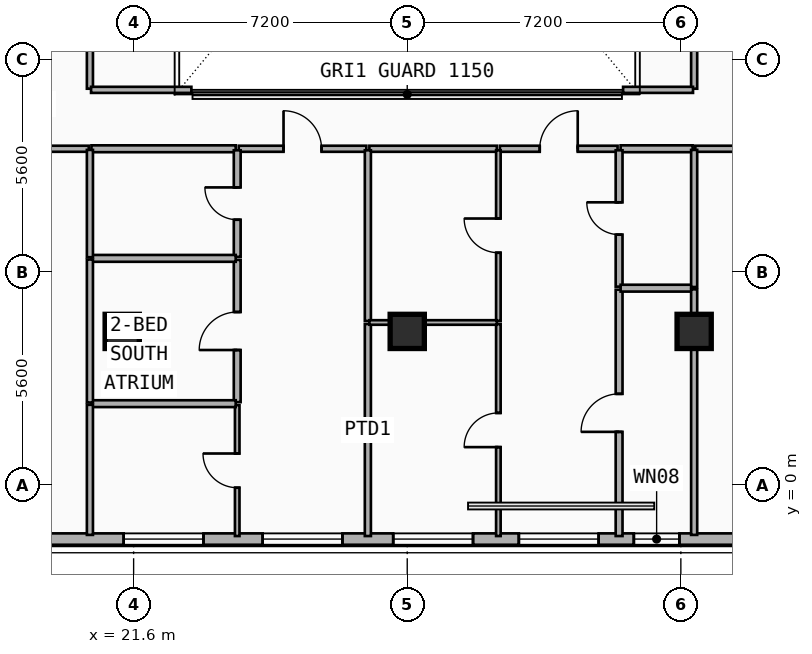
"""IFC4 building model, lengths in metres.
Left out: names, types, materials, properties, quantities, classifications, styles, units other than length and angle.
Written with IfcOpenShell. Run it as: python <this file> out.ifc"""

import sys

from ifc_helpers import new_model, si_unit, direction, frame, frame_2d, origin, origin_2d, place, context, subcontext, project, spatial, rectangle, extrude, element, fill, save


model = new_model("IFC4")
c1 = context("Model", 3, precision=1e-05, world=origin(), true_north=direction((0.0, 1.0)))
c2 = subcontext(c1, "Body", "Model", "MODEL_VIEW")
j1 = project(units=[si_unit("LENGTHUNIT", "METRE"), si_unit("PLANEANGLEUNIT", "RADIAN")], contexts=[c1])
p1 = place(None, origin())
s1 = spatial("IfcSite", under=j1, at=p1, CompositionType="ELEMENT")
p2 = place(p1, origin())
s2 = spatial("IfcBuilding", under=s1, at=p2, CompositionType="ELEMENT")
p3 = place(p2, frame((0.0, 0.0, 243.6)))
s3 = spatial("IfcBuildingStorey", under=s2, at=p3, CompositionType="ELEMENT", Elevation=243.6)
for number, where, z_axis, x_axis in (
    (1, (21.3, 4.153, 0.0), (0.0, -0.09, 0.996), (1.0, 0.0, 0.0)),
    (2, (28.8, 4.153, 0.0), (0.0, -0.09, 0.996), (1.0, 0.0, 0.0)),
    (3, (36.35, 4.153, 0.0), (0.0, -0.09, 0.996), (1.0, 0.0, 0.0)),
):
    element("IfcColumn", number, at=place(p3, frame(where, z_axis=z_axis, x_axis=x_axis)), inside=s3, PredefinedType="COLUMN", context=c2, shape_type="SweptSolid", body=[
        extrude(rectangle(XDim=0.9, YDim=0.9, at=origin_2d()), origin(), (0.0, 0.0, 1.0), 3.715),
    ])
p4 = place(p3, frame((45.2, -1.42, 0.0), z_axis=(0.0, 0.0, 1.0), x_axis=(-1.0, 0.0, 0.0)))
e4 = element("IfcWall", 4, at=p4, inside=s3, PredefinedType="SOLIDWALL", context=c2, shape_type="SweptSolid", body=[
    extrude(rectangle(XDim=32.8, YDim=0.3, at=frame_2d((16.4, 0.0))), origin(), (0.0, 0.0, 1.0), 3.42),
])
p5 = place(p4, frame((29.071, 0.0, 0.75)))
e5 = element("IfcOpeningElement", 5, at=p5, cuts=e4, PredefinedType="OPENING", context=c2, shape_type="SweptSolid", body=[
    extrude(rectangle(XDim=2.1, YDim=2.1, at=frame_2d((1.05, 1.05))), frame((0.0, 0.16, 0.0), z_axis=(0.0, -1.0, 0.0), x_axis=(1.0, 0.0, 0.0)), (0.0, 0.0, 1.0), 0.32),
])
p6 = place(p4, frame((26.745, 0.0, 0.75)))
e6 = element("IfcOpeningElement", 6, at=p6, cuts=e4, PredefinedType="OPENING", context=c2, shape_type="SweptSolid", body=[
    extrude(rectangle(XDim=1.6, YDim=1.95, at=frame_2d((0.8, 0.975))), frame((0.0, 0.16, 0.0), z_axis=(0.0, -1.0, 0.0), x_axis=(1.0, 0.0, 0.0)), (0.0, 0.0, 1.0), 0.32),
])
p7 = place(p4, frame((18.105, 0.0, 0.75)))
e7 = element("IfcOpeningElement", 7, at=p7, cuts=e4, PredefinedType="OPENING", context=c2, shape_type="SweptSolid", body=[
    extrude(rectangle(XDim=2.1, YDim=2.1, at=frame_2d((1.05, 1.05))), frame((0.0, 0.16, 0.0), z_axis=(0.0, -1.0, 0.0), x_axis=(1.0, 0.0, 0.0)), (0.0, 0.0, 1.0), 0.32),
])
p8 = place(p4, frame((21.762, 0.0, 0.75)))
e8 = element("IfcOpeningElement", 8, at=p8, cuts=e4, PredefinedType="OPENING", context=c2, shape_type="SweptSolid", body=[
    extrude(rectangle(XDim=2.1, YDim=2.1, at=frame_2d((1.05, 1.05))), frame((0.0, 0.16, 0.0), z_axis=(0.0, -1.0, 0.0), x_axis=(1.0, 0.0, 0.0)), (0.0, 0.0, 1.0), 0.32),
])
p9 = place(p4, frame((11.364, 0.0, 0.75)))
e9 = element("IfcOpeningElement", 9, at=p9, cuts=e4, PredefinedType="OPENING", context=c2, shape_type="SweptSolid", body=[
    extrude(rectangle(XDim=2.1, YDim=2.1, at=frame_2d((1.05, 1.05))), frame((0.0, 0.16, 0.0), z_axis=(0.0, -1.0, 0.0), x_axis=(1.0, 0.0, 0.0)), (0.0, 0.0, 1.0), 0.32),
])
p10 = place(p4, frame((9.238, 0.0, 0.68)))
e10 = element("IfcOpeningElement", 10, at=p10, cuts=e4, PredefinedType="OPENING", context=c2, shape_type="SweptSolid", body=[
    extrude(rectangle(XDim=1.2, YDim=1.5, at=frame_2d((0.6, 0.75))), frame((0.0, 0.16, 0.0), z_axis=(0.0, -1.0, 0.0), x_axis=(1.0, 0.0, 0.0)), (0.0, 0.0, 1.0), 0.32),
])
p11 = place(p4, frame((14.669, 0.0, 0.75)))
e11 = element("IfcOpeningElement", 11, at=p11, cuts=e4, PredefinedType="OPENING", context=c2, shape_type="SweptSolid", body=[
    extrude(rectangle(XDim=2.1, YDim=2.1, at=frame_2d((1.05, 1.05))), frame((0.0, 0.16, 0.0), z_axis=(0.0, -1.0, 0.0), x_axis=(1.0, 0.0, 0.0)), (0.0, 0.0, 1.0), 0.32),
])
p12 = place(p4, frame((1.937, 0.0, 0.75)))
e12 = element("IfcOpeningElement", 12, at=p12, cuts=e4, PredefinedType="OPENING", context=c2, shape_type="SweptSolid", body=[
    extrude(rectangle(XDim=2.1, YDim=2.1, at=frame_2d((1.05, 1.05))), frame((0.0, 0.16, 0.0), z_axis=(0.0, -1.0, 0.0), x_axis=(1.0, 0.0, 0.0)), (0.0, 0.0, 1.0), 0.32),
])
p13 = place(p4, frame((4.709, 0.0, 0.8)))
e13 = element("IfcOpeningElement", 13, at=p13, cuts=e4, PredefinedType="OPENING", context=c2, shape_type="SweptSolid", body=[
    extrude(rectangle(XDim=1.8, YDim=1.8, at=frame_2d((0.9, 0.9))), frame((0.0, 0.16, 0.0), z_axis=(0.0, -1.0, 0.0), x_axis=(1.0, 0.0, 0.0)), (0.0, 0.0, 1.0), 0.32),
])
p14 = place(p3, frame((24.366, 8.85, 0.0), z_axis=(0.0, 0.0, 1.0), x_axis=(1.0, 0.0, 0.0)))
e14 = element("IfcWall", 14, at=p14, inside=s3, PredefinedType="PARTITIONING", context=c2, shape_type="SweptSolid", body=[
    extrude(rectangle(XDim=3.358, YDim=0.16, at=frame_2d((1.679, 0.0))), origin(), (0.0, 0.0, 1.0), 3.42),
])
p15 = place(p14, frame((1.179, 0.0, 0.0)))
e15 = element("IfcOpeningElement", 15, at=p15, cuts=e14, PredefinedType="OPENING", context=c2, shape_type="SweptSolid", body=[
    extrude(rectangle(XDim=1.0, YDim=2.15, at=frame_2d((0.5, 1.075))), frame((0.0, 0.09, 0.0), z_axis=(0.0, -1.0, 0.0), x_axis=(1.0, 0.0, 0.0)), (0.0, 0.0, 1.0), 0.18),
])
p16 = place(p3, frame((20.49, 8.85, 0.0), z_axis=(0.0, 0.0, 1.0), x_axis=(1.0, 0.0, 0.0)))
e16 = element("IfcWall", 16, at=p16, inside=s3, PredefinedType="PLUMBINGWALL", context=c2, shape_type="SweptSolid", body=[
    extrude(rectangle(XDim=3.796, YDim=0.18, at=frame_2d((1.898, 0.0))), origin(), (0.0, 0.0, 1.0), 2.7),
])
p17 = place(p3, frame((31.238, 8.85, 0.0), z_axis=(0.0, 0.0, 1.0), x_axis=(1.0, 0.0, 0.0)))
e17 = element("IfcWall", 17, at=p17, inside=s3, PredefinedType="PARTITIONING", context=c2, shape_type="SweptSolid", body=[
    extrude(rectangle(XDim=3.097, YDim=0.16, at=frame_2d((1.548, 0.0))), origin(), (0.0, 0.0, 1.0), 3.42),
])
p18 = place(p17, frame((1.049, 0.0, 0.0)))
e18 = element("IfcOpeningElement", 18, at=p18, cuts=e17, PredefinedType="OPENING", context=c2, shape_type="SweptSolid", body=[
    extrude(rectangle(XDim=1.0, YDim=2.15, at=frame_2d((0.5, 1.075))), frame((0.0, 0.09, 0.0), z_axis=(0.0, -1.0, 0.0), x_axis=(1.0, 0.0, 0.0)), (0.0, 0.0, 1.0), 0.18),
])
p19 = place(p3, frame((34.415, 8.85, 0.0), z_axis=(0.0, 0.0, 1.0), x_axis=(1.0, 0.0, 0.0)))
e19 = element("IfcWall", 19, at=p19, inside=s3, PredefinedType="PLUMBINGWALL", context=c2, shape_type="SweptSolid", body=[
    extrude(rectangle(XDim=1.895, YDim=0.18, at=frame_2d((0.948, 0.0))), origin(), (0.0, 0.0, 1.0), 2.7),
])
p20 = place(p3, frame((27.804, 8.85, 0.0), z_axis=(0.0, 0.0, 1.0), x_axis=(1.0, 0.0, 0.0)))
e20 = element("IfcWall", 20, at=p20, inside=s3, PredefinedType="PARTITIONING", context=c2, shape_type="SweptSolid", body=[
    extrude(rectangle(XDim=3.354, YDim=0.16, at=frame_2d((1.677, 0.0))), origin(), (0.0, 0.0, 1.0), 2.7),
])
p21 = place(p3, frame((24.326, -1.34, 0.0), z_axis=(0.0, 0.0, 1.0), x_axis=(0.0, 1.0, 0.0)))
e21 = element("IfcWall", 21, at=p21, inside=s3, PredefinedType="PARTITIONING", context=c2, shape_type="SweptSolid", body=[
    extrude(rectangle(XDim=3.443, YDim=0.12, at=frame_2d((1.722, 0.0))), origin(), (0.0, 0.0, 1.0), 3.42),
])
p22 = place(p21, frame((1.271, 0.0, 0.0)))
e22 = element("IfcOpeningElement", 22, at=p22, cuts=e21, PredefinedType="OPENING", context=c2, shape_type="SweptSolid", body=[
    extrude(rectangle(XDim=0.9, YDim=2.1, at=frame_2d((0.45, 1.05))), frame((0.0, 0.07, 0.0), z_axis=(0.0, -1.0, 0.0), x_axis=(1.0, 0.0, 0.0)), (0.0, 0.0, 1.0), 0.14),
])
p23 = place(p3, frame((24.326, 2.183, 0.0), z_axis=(0.0, 0.0, 1.0), x_axis=(0.0, 1.0, 0.0)))
e23 = element("IfcWall", 23, at=p23, inside=s3, PredefinedType="PLUMBINGWALL", context=c2, shape_type="SweptSolid", body=[
    extrude(rectangle(XDim=3.743, YDim=0.18, at=frame_2d((1.872, 0.0))), origin(), (0.0, 0.0, 1.0), 3.08),
])
p24 = place(p23, frame((1.372, 0.0, 0.0)))
e24 = element("IfcOpeningElement", 24, at=p24, cuts=e23, PredefinedType="OPENING", context=c2, shape_type="SweptSolid", body=[
    extrude(rectangle(XDim=1.0, YDim=2.15, at=frame_2d((0.5, 1.075))), frame((0.0, 0.1, 0.0), z_axis=(0.0, -1.0, 0.0), x_axis=(1.0, 0.0, 0.0)), (0.0, 0.0, 1.0), 0.2),
])
p25 = place(p3, frame((24.326, 6.006, 0.0), z_axis=(0.0, 0.0, 1.0), x_axis=(0.0, 1.0, 0.0)))
e25 = element("IfcWall", 25, at=p25, inside=s3, PredefinedType="PLUMBINGWALL", context=c2, shape_type="SweptSolid", body=[
    extrude(rectangle(XDim=2.804, YDim=0.18, at=frame_2d((1.402, 0.0))), origin(), (0.0, 0.0, 1.0), 3.04),
])
p26 = place(p25, frame((0.977, 0.0, 0.0)))
e26 = element("IfcOpeningElement", 26, at=p26, cuts=e25, PredefinedType="OPENING", context=c2, shape_type="SweptSolid", body=[
    extrude(rectangle(XDim=0.85, YDim=2.1, at=frame_2d((0.425, 1.05))), frame((0.0, 0.1, 0.0), z_axis=(0.0, -1.0, 0.0), x_axis=(1.0, 0.0, 0.0)), (0.0, 0.0, 1.0), 0.2),
])
p27 = place(p3, frame((27.764, -1.34, 0.0), z_axis=(0.0, 0.0, 1.0), x_axis=(0.0, 1.0, 0.0)))
e27 = element("IfcWall", 27, at=p27, inside=s3, PredefinedType="PARTITIONING", context=c2, shape_type="SweptSolid", body=[
    extrude(rectangle(XDim=5.579, YDim=0.16, at=frame_2d((2.79, 0.0))), origin(), (0.0, 0.0, 1.0), 3.08),
])
p28 = place(p3, frame((27.764, 4.319, 0.0), z_axis=(0.0, 0.0, 1.0), x_axis=(0.0, 1.0, 0.0)))
e28 = element("IfcWall", 28, at=p28, inside=s3, PredefinedType="PARTITIONING", context=c2, shape_type="SweptSolid", body=[
    extrude(rectangle(XDim=4.491, YDim=0.16, at=frame_2d((2.246, 0.0))), origin(), (0.0, 0.0, 1.0), 3.04),
])
p29 = place(p3, frame((20.49, 2.143, 0.0), z_axis=(0.0, 0.0, 1.0), x_axis=(1.0, 0.0, 0.0)))
e29 = element("IfcWall", 29, at=p29, inside=s3, PredefinedType="PLUMBINGWALL", context=c2, shape_type="SweptSolid", body=[
    extrude(rectangle(XDim=3.796, YDim=0.18, at=frame_2d((1.898, 0.0))), origin(), (0.0, 0.0, 1.0), 3.42),
])
p30 = place(p3, frame((20.49, 5.966, 0.0), z_axis=(0.0, 0.0, 1.0), x_axis=(1.0, 0.0, 0.0)))
e30 = element("IfcWall", 30, at=p30, inside=s3, PredefinedType="PLUMBINGWALL", context=c2, shape_type="SweptSolid", body=[
    extrude(rectangle(XDim=3.796, YDim=0.18, at=frame_2d((1.898, 0.0))), origin(), (0.0, 0.0, 1.0), 2.7),
])
p31 = place(p3, frame((34.375, -1.34, 0.0), z_axis=(0.0, 0.0, 1.0), x_axis=(0.0, 1.0, 0.0)))
e31 = element("IfcWall", 31, at=p31, inside=s3, PredefinedType="PLUMBINGWALL", context=c2, shape_type="SweptSolid", body=[
    extrude(rectangle(XDim=6.482, YDim=0.18, at=frame_2d((3.241, 0.0))), origin(), (0.0, 0.0, 1.0), 3.08),
])
p32 = place(p31, frame((2.741, 0.0, 0.0)))
e32 = element("IfcOpeningElement", 32, at=p32, cuts=e31, PredefinedType="OPENING", context=c2, shape_type="SweptSolid", body=[
    extrude(rectangle(XDim=1.0, YDim=2.15, at=frame_2d((0.5, 1.075))), frame((0.0, 0.1, 0.0), z_axis=(0.0, -1.0, 0.0), x_axis=(1.0, 0.0, 0.0)), (0.0, 0.0, 1.0), 0.2),
])
p33 = place(p3, frame((34.375, 5.222, 0.0), z_axis=(0.0, 0.0, 1.0), x_axis=(0.0, 1.0, 0.0)))
e33 = element("IfcWall", 33, at=p33, inside=s3, PredefinedType="PLUMBINGWALL", context=c2, shape_type="SweptSolid", body=[
    extrude(rectangle(XDim=3.588, YDim=0.18, at=frame_2d((1.794, 0.0))), origin(), (0.0, 0.0, 1.0), 3.04),
])
p34 = place(p33, frame((1.369, 0.0, 0.0)))
e34 = element("IfcOpeningElement", 34, at=p34, cuts=e33, PredefinedType="OPENING", context=c2, shape_type="SweptSolid", body=[
    extrude(rectangle(XDim=0.85, YDim=2.1, at=frame_2d((0.425, 1.05))), frame((0.0, 0.1, 0.0), z_axis=(0.0, -1.0, 0.0), x_axis=(1.0, 0.0, 0.0)), (0.0, 0.0, 1.0), 0.2),
])
p35 = place(p3, frame((31.198, -1.34, 0.0), z_axis=(0.0, 0.0, 1.0), x_axis=(0.0, 1.0, 0.0)))
e35 = element("IfcWall", 35, at=p35, inside=s3, PredefinedType="PARTITIONING", context=c2, shape_type="SweptSolid", body=[
    extrude(rectangle(XDim=5.579, YDim=0.12, at=frame_2d((2.79, 0.0))), origin(), (0.0, 0.0, 1.0), 3.08),
])
p36 = place(p35, frame((2.34, 0.0, 0.0)))
e36 = element("IfcOpeningElement", 36, at=p36, cuts=e35, PredefinedType="OPENING", context=c2, shape_type="SweptSolid", body=[
    extrude(rectangle(XDim=0.9, YDim=2.1, at=frame_2d((0.45, 1.05))), frame((0.0, 0.07, 0.0), z_axis=(0.0, -1.0, 0.0), x_axis=(1.0, 0.0, 0.0)), (0.0, 0.0, 1.0), 0.14),
])
p37 = place(p3, frame((31.198, 4.319, 0.0), z_axis=(0.0, 0.0, 1.0), x_axis=(0.0, 1.0, 0.0)))
e37 = element("IfcWall", 37, at=p37, inside=s3, PredefinedType="PARTITIONING", context=c2, shape_type="SweptSolid", body=[
    extrude(rectangle(XDim=4.491, YDim=0.12, at=frame_2d((2.246, 0.0))), origin(), (0.0, 0.0, 1.0), 3.04),
])
p38 = place(p37, frame((1.795, 0.0, 0.0)))
e38 = element("IfcOpeningElement", 38, at=p38, cuts=e37, PredefinedType="OPENING", context=c2, shape_type="SweptSolid", body=[
    extrude(rectangle(XDim=0.9, YDim=2.1, at=frame_2d((0.45, 1.05))), frame((0.0, 0.07, 0.0), z_axis=(0.0, -1.0, 0.0), x_axis=(1.0, 0.0, 0.0)), (0.0, 0.0, 1.0), 0.14),
])
p39 = place(p3, frame((34.415, 5.182, 0.0), z_axis=(0.0, 0.0, 1.0), x_axis=(1.0, 0.0, 0.0)))
e39 = element("IfcWall", 39, at=p39, inside=s3, PredefinedType="PLUMBINGWALL", context=c2, shape_type="SweptSolid", body=[
    extrude(rectangle(XDim=1.895, YDim=0.18, at=frame_2d((0.948, 0.0))), origin(), (0.0, 0.0, 1.0), 2.7),
])
p40 = place(p3, frame((27.804, 4.279, 0.0), z_axis=(0.0, 0.0, 1.0), x_axis=(1.0, 0.0, 0.0)))
e40 = element("IfcWall", 40, at=p40, inside=s3, PredefinedType="PARTITIONING", context=c2, shape_type="SweptSolid", body=[
    extrude(rectangle(XDim=3.354, YDim=0.12, at=frame_2d((1.677, 0.0))), origin(), (0.0, 0.0, 1.0), 2.7),
])
p41 = place(p3, frame((18.88, 8.85, 0.0), z_axis=(0.0, 0.0, 1.0), x_axis=(1.0, 0.0, 0.0)))
e41 = element("IfcWall", 41, at=p41, inside=s3, PredefinedType="PARTITIONING", context=c2, shape_type="SweptSolid", body=[
    extrude(rectangle(XDim=1.54, YDim=0.16, at=frame_2d((0.77, 0.0))), origin(), (0.0, 0.0, 1.0), 3.42),
])
p42 = place(p3, frame((20.45, 10.43, 0.0), z_axis=(0.0, 0.0, 1.0), x_axis=(0.0, 1.0, 0.0)))
e42 = element("IfcWall", 42, at=p42, inside=s3, PredefinedType="PARTITIONING", context=c2, shape_type="SweptSolid", body=[
    extrude(rectangle(XDim=14.99, YDim=0.16, at=frame_2d((7.495, 0.0))), origin(), (0.0, 0.0, 1.0), 2.9),
])
p43 = place(p3, frame((36.38, 8.85, 0.0), z_axis=(0.0, 0.0, 1.0), x_axis=(1.0, 0.0, 0.0)))
e43 = element("IfcWall", 43, at=p43, inside=s3, PredefinedType="PARTITIONING", context=c2, shape_type="SweptSolid", body=[
    extrude(rectangle(XDim=1.94, YDim=0.16, at=frame_2d((0.97, 0.0))), origin(), (0.0, 0.0, 1.0), 2.7),
])
p44 = place(p3, frame((36.35, 10.43, 0.0), z_axis=(0.0, 0.0, 1.0), x_axis=(0.0, 1.0, 0.0)))
e44 = element("IfcWall", 44, at=p44, inside=s3, PredefinedType="PARTITIONING", context=c2, shape_type="SweptSolid", body=[
    extrude(rectangle(XDim=14.99, YDim=0.16, at=frame_2d((7.495, 0.0))), origin(), (0.0, 0.0, 1.0), 2.7),
])
p45 = place(p3, frame((20.48, 10.4, 0.0), z_axis=(0.0, 0.0, 1.0), x_axis=(1.0, 0.0, 0.0)))
e45 = element("IfcWall", 45, at=p45, inside=s3, PredefinedType="PARTITIONING", context=c2, shape_type="SweptSolid", body=[
    extrude(rectangle(XDim=2.64, YDim=0.16, at=frame_2d((1.32, 0.0))), origin(), (0.0, 0.0, 1.0), 2.7),
])
p46 = place(p3, frame((34.48, 10.4, 0.0), z_axis=(0.0, 0.0, 1.0), x_axis=(1.0, 0.0, 0.0)))
e46 = element("IfcWall", 46, at=p46, inside=s3, PredefinedType="PARTITIONING", context=c2, shape_type="SweptSolid", body=[
    extrude(rectangle(XDim=1.84, YDim=0.16, at=frame_2d((0.92, 0.0))), origin(), (0.0, 0.0, 1.0), 2.7),
])
p47 = place(p3, frame((20.45, -1.31, 0.0), z_axis=(0.0, 0.0, 1.0), x_axis=(0.0, 1.0, 0.0)))
e47 = element("IfcWall", 47, at=p47, inside=s3, PredefinedType="PARTITIONING", context=c2, shape_type="SweptSolid", body=[
    extrude(rectangle(XDim=3.423, YDim=0.16, at=frame_2d((1.711, 0.0))), origin(), (0.0, 0.0, 1.0), 3.42),
])
p48 = place(p3, frame((20.45, 2.173, 0.0), z_axis=(0.0, 0.0, 1.0), x_axis=(0.0, 1.0, 0.0)))
e48 = element("IfcWall", 48, at=p48, inside=s3, PredefinedType="PARTITIONING", context=c2, shape_type="SweptSolid", body=[
    extrude(rectangle(XDim=3.763, YDim=0.16, at=frame_2d((1.881, 0.0))), origin(), (0.0, 0.0, 1.0), 3.08),
])
p49 = place(p3, frame((20.45, 5.996, 0.0), z_axis=(0.0, 0.0, 1.0), x_axis=(0.0, 1.0, 0.0)))
e49 = element("IfcWall", 49, at=p49, inside=s3, PredefinedType="PARTITIONING", context=c2, shape_type="SweptSolid", body=[
    extrude(rectangle(XDim=2.824, YDim=0.16, at=frame_2d((1.412, 0.0))), origin(), (0.0, 0.0, 1.0), 3.05),
])
p50 = place(p3, frame((36.35, -1.31, 0.0), z_axis=(0.0, 0.0, 1.0), x_axis=(0.0, 1.0, 0.0)))
e50 = element("IfcWall", 50, at=p50, inside=s3, PredefinedType="PARTITIONING", context=c2, shape_type="SweptSolid", body=[
    extrude(rectangle(XDim=6.462, YDim=0.16, at=frame_2d((3.231, 0.0))), origin(), (0.0, 0.0, 1.0), 2.7),
])
p51 = place(p3, frame((36.35, 5.212, 0.0), z_axis=(0.0, 0.0, 1.0), x_axis=(0.0, 1.0, 0.0)))
e51 = element("IfcWall", 51, at=p51, inside=s3, PredefinedType="PARTITIONING", context=c2, shape_type="SweptSolid", body=[
    extrude(rectangle(XDim=3.608, YDim=0.16, at=frame_2d((1.804, 0.0))), origin(), (0.0, 0.0, 1.0), 2.7),
])
p52 = place(p7, origin())
e52 = element("IfcWindow", 52, at=p52, inside=s3, PartitioningType="SINGLE_PANEL", PredefinedType="WINDOW", context=c2, shape_type="SweptSolid", body=[
    extrude(rectangle(XDim=2.1, YDim=2.1, at=frame_2d((1.05, 1.05))), frame((0.0, 0.03, 0.0), z_axis=(0.0, -1.0, 0.0), x_axis=(1.0, 0.0, 0.0)), (0.0, 0.0, 1.0), 0.06),
])
fill(e7, e52)
p53 = place(p8, origin())
e53 = element("IfcWindow", 53, at=p53, inside=s3, PartitioningType="SINGLE_PANEL", PredefinedType="WINDOW", context=c2, shape_type="SweptSolid", body=[
    extrude(rectangle(XDim=2.1, YDim=2.1, at=frame_2d((1.05, 1.05))), frame((0.0, 0.03, 0.0), z_axis=(0.0, -1.0, 0.0), x_axis=(1.0, 0.0, 0.0)), (0.0, 0.0, 1.0), 0.06),
])
fill(e8, e53)
p54 = place(p9, origin())
e54 = element("IfcWindow", 54, at=p54, inside=s3, PartitioningType="SINGLE_PANEL", PredefinedType="WINDOW", context=c2, shape_type="SweptSolid", body=[
    extrude(rectangle(XDim=2.1, YDim=2.1, at=frame_2d((1.05, 1.05))), frame((0.0, 0.03, 0.0), z_axis=(0.0, -1.0, 0.0), x_axis=(1.0, 0.0, 0.0)), (0.0, 0.0, 1.0), 0.06),
])
fill(e9, e54)
p55 = place(p10, origin())
e55 = element("IfcWindow", 55, at=p55, inside=s3, PartitioningType="SINGLE_PANEL", PredefinedType="WINDOW", context=c2, shape_type="SweptSolid", body=[
    extrude(rectangle(XDim=1.2, YDim=1.5, at=frame_2d((0.6, 0.75))), frame((0.0, 0.03, 0.0), z_axis=(0.0, -1.0, 0.0), x_axis=(1.0, 0.0, 0.0)), (0.0, 0.0, 1.0), 0.06),
])
fill(e10, e55)
p56 = place(p11, origin())
e56 = element("IfcWindow", 56, at=p56, inside=s3, PartitioningType="SINGLE_PANEL", PredefinedType="WINDOW", context=c2, shape_type="SweptSolid", body=[
    extrude(rectangle(XDim=2.1, YDim=2.1, at=frame_2d((1.05, 1.05))), frame((0.0, 0.03, 0.0), z_axis=(0.0, -1.0, 0.0), x_axis=(1.0, 0.0, 0.0)), (0.0, 0.0, 1.0), 0.06),
])
fill(e11, e56)
p57 = place(p15, origin())
e57 = element("IfcDoor", 57, at=p57, inside=s3, OperationType="SINGLE_SWING_LEFT", PredefinedType="DOOR", context=c2, shape_type="SweptSolid", body=[
    extrude(rectangle(XDim=1.0, YDim=2.15, at=frame_2d((0.5, 1.075))), frame((0.0, 0.025, 0.0), z_axis=(0.0, -1.0, 0.0), x_axis=(1.0, 0.0, 0.0)), (0.0, 0.0, 1.0), 0.05),
])
fill(e15, e57)
p58 = place(p18, origin())
e58 = element("IfcDoor", 58, at=p58, inside=s3, OperationType="SINGLE_SWING_RIGHT", PredefinedType="DOOR", context=c2, shape_type="SweptSolid", body=[
    extrude(rectangle(XDim=1.0, YDim=2.15, at=frame_2d((0.5, 1.075))), frame((0.0, 0.025, 0.0), z_axis=(0.0, -1.0, 0.0), x_axis=(1.0, 0.0, 0.0)), (0.0, 0.0, 1.0), 0.05),
])
fill(e18, e58)
p59 = place(p22, origin())
e59 = element("IfcDoor", 59, at=p59, inside=s3, OperationType="SINGLE_SWING_RIGHT", PredefinedType="DOOR", context=c2, shape_type="SweptSolid", body=[
    extrude(rectangle(XDim=0.9, YDim=2.1, at=frame_2d((0.45, 1.05))), frame((0.0, 0.025, 0.0), z_axis=(0.0, -1.0, 0.0), x_axis=(1.0, 0.0, 0.0)), (0.0, 0.0, 1.0), 0.05),
])
fill(e22, e59)
p60 = place(p24, origin())
e60 = element("IfcDoor", 60, at=p60, inside=s3, OperationType="SINGLE_SWING_LEFT", PredefinedType="DOOR", context=c2, shape_type="SweptSolid", body=[
    extrude(rectangle(XDim=1.0, YDim=2.15, at=frame_2d((0.5, 1.075))), frame((0.0, 0.025, 0.0), z_axis=(0.0, -1.0, 0.0), x_axis=(1.0, 0.0, 0.0)), (0.0, 0.0, 1.0), 0.05),
])
fill(e24, e60)
p61 = place(p26, origin())
e61 = element("IfcDoor", 61, at=p61, inside=s3, OperationType="SINGLE_SWING_RIGHT", PredefinedType="DOOR", context=c2, shape_type="SweptSolid", body=[
    extrude(rectangle(XDim=0.85, YDim=2.1, at=frame_2d((0.425, 1.05))), frame((0.0, 0.025, 0.0), z_axis=(0.0, -1.0, 0.0), x_axis=(1.0, 0.0, 0.0)), (0.0, 0.0, 1.0), 0.05),
])
fill(e26, e61)
p62 = place(p32, origin())
e62 = element("IfcDoor", 62, at=p62, inside=s3, OperationType="SINGLE_SWING_LEFT", PredefinedType="DOOR", context=c2, shape_type="SweptSolid", body=[
    extrude(rectangle(XDim=1.0, YDim=2.15, at=frame_2d((0.5, 1.075))), frame((0.0, 0.025, 0.0), z_axis=(0.0, -1.0, 0.0), x_axis=(1.0, 0.0, 0.0)), (0.0, 0.0, 1.0), 0.05),
])
fill(e32, e62)
p63 = place(p34, origin())
e63 = element("IfcDoor", 63, at=p63, inside=s3, OperationType="SINGLE_SWING_RIGHT", PredefinedType="DOOR", context=c2, shape_type="SweptSolid", body=[
    extrude(rectangle(XDim=0.85, YDim=2.1, at=frame_2d((0.425, 1.05))), frame((0.0, 0.025, 0.0), z_axis=(0.0, -1.0, 0.0), x_axis=(1.0, 0.0, 0.0)), (0.0, 0.0, 1.0), 0.05),
])
fill(e34, e63)
p64 = place(p36, origin())
e64 = element("IfcDoor", 64, at=p64, inside=s3, OperationType="SINGLE_SWING_LEFT", PredefinedType="DOOR", context=c2, shape_type="SweptSolid", body=[
    extrude(rectangle(XDim=0.9, YDim=2.1, at=frame_2d((0.45, 1.05))), frame((0.0, 0.025, 0.0), z_axis=(0.0, -1.0, 0.0), x_axis=(1.0, 0.0, 0.0)), (0.0, 0.0, 1.0), 0.05),
])
fill(e36, e64)
p65 = place(p38, origin())
e65 = element("IfcDoor", 65, at=p65, inside=s3, OperationType="SINGLE_SWING_RIGHT", PredefinedType="DOOR", context=c2, shape_type="SweptSolid", body=[
    extrude(rectangle(XDim=0.9, YDim=2.1, at=frame_2d((0.45, 1.05))), frame((0.0, 0.025, 0.0), z_axis=(0.0, -1.0, 0.0), x_axis=(1.0, 0.0, 0.0)), (0.0, 0.0, 1.0), 0.05),
])
fill(e38, e65)
save(model, sys.argv[1])
